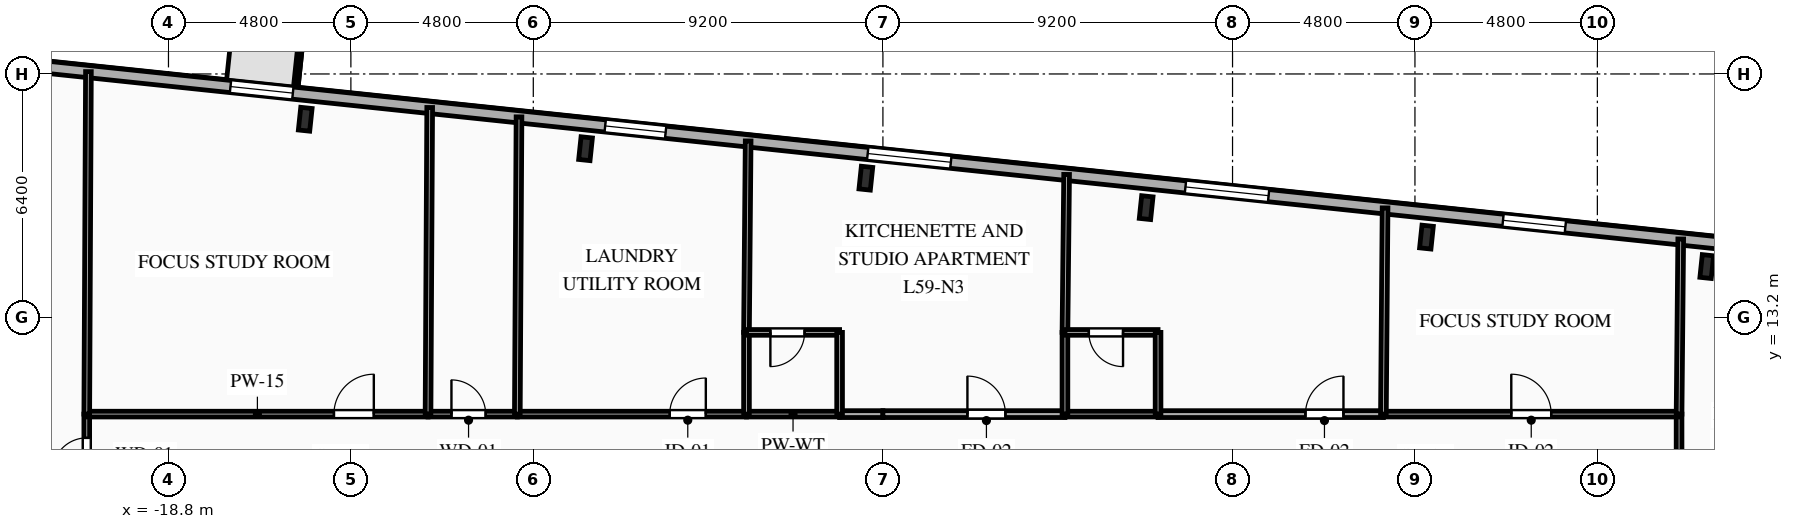
"""IFC4 building model, lengths in metres.
Left out: names, types, materials, properties, quantities, classifications, styles, units other than length and angle.
Written with IfcOpenShell. Run it as: python <this file> out.ifc"""

import sys

from ifc_helpers import new_model, si_unit, direction, frame, frame_2d, origin, origin_2d, place, context, subcontext, project, spatial, rectangle, i_section, extrude, element, fill, save


model = new_model("IFC4")
c1 = context("Model", 3, precision=1e-05, world=origin(), true_north=direction((0.0, 1.0)))
c2 = subcontext(c1, "Body", "Model", "MODEL_VIEW")
j1 = project(units=[si_unit("LENGTHUNIT", "METRE"), si_unit("PLANEANGLEUNIT", "RADIAN")], contexts=[c1])
p1 = place(None, origin())
s1 = spatial("IfcSite", under=j1, at=p1, CompositionType="ELEMENT")
p2 = place(p1, origin())
s2 = spatial("IfcBuilding", under=s1, at=p2, CompositionType="ELEMENT")
p3 = place(p2, frame((0.0, 0.0, 209.8)))
s3 = spatial("IfcBuildingStorey", under=s2, at=p3, CompositionType="ELEMENT", Elevation=209.8)
for number, where, z_axis, x_axis in (
    (1, (21.679, 14.532, 0.0), (0.0, 0.0, 1.0), (0.995, -0.105, 0.0)),
    (2, (14.303, 15.308, 0.0), (0.0, 0.0, 1.0), (0.995, -0.105, 0.0)),
    (3, (6.927, 16.083, 0.0), (0.0, 0.0, 1.0), (0.995, -0.105, 0.0)),
    (4, (-0.449, 16.858, 0.0), (0.0, 0.0, 1.0), (0.995, -0.105, 0.0)),
    (5, (-7.825, 17.634, 0.0), (0.0, 0.0, 1.0), (0.995, -0.105, 0.0)),
    (6, (-15.201, 18.409, 0.0), (0.0, 0.0, 1.0), (0.995, -0.105, 0.0)),
):
    element("IfcColumn", number, at=place(p3, frame(where, z_axis=z_axis, x_axis=x_axis)), inside=s3, PredefinedType="COLUMN", context=c2, shape_type="SweptSolid", body=[
        extrude(i_section(OverallWidth=0.3, OverallDepth=0.6, WebThickness=0.015, FlangeThickness=0.03, FilletRadius=0.027, at=origin_2d()), origin(), (0.0, 0.0, 1.0), 3.35),
    ])
p4 = place(p3, frame((-23.156, 19.898, 0.0), z_axis=(0.0, 0.0, 1.0), x_axis=(0.994522001802, -0.104527450613, 0.0)))
e7 = element("IfcWall", 7, at=p4, inside=s3, PredefinedType="SOLIDWALL", context=c2, shape_type="SweptSolid", body=[
    extrude(rectangle(XDim=45.8, YDim=0.32, at=frame_2d((22.9, 0.0))), origin(), (0.0, 0.0, 1.0), 3.04),
])
p5 = place(p4, frame((6.021, 0.0, 0.85)))
e8 = element("IfcOpeningElement", 8, at=p5, cuts=e7, PredefinedType="OPENING", context=c2, shape_type="SweptSolid", body=[
    extrude(rectangle(XDim=1.65, YDim=1.85, at=frame_2d((0.825, 0.925))), frame((0.0, 0.17, 0.0), z_axis=(0.0, -1.0, 0.0), x_axis=(1.0, 0.0, 0.0)), (0.0, 0.0, 1.0), 0.34),
])
p6 = place(p4, frame((15.935, 0.0, 0.85)))
e9 = element("IfcOpeningElement", 9, at=p6, cuts=e7, PredefinedType="OPENING", context=c2, shape_type="SweptSolid", body=[
    extrude(rectangle(XDim=1.6, YDim=1.85, at=frame_2d((0.8, 0.925))), frame((0.0, 0.17, 0.0), z_axis=(0.0, -1.0, 0.0), x_axis=(1.0, 0.0, 0.0)), (0.0, 0.0, 1.0), 0.34),
])
p7 = place(p4, frame((22.881, 0.0, 0.85)))
e10 = element("IfcOpeningElement", 10, at=p7, cuts=e7, PredefinedType="OPENING", context=c2, shape_type="SweptSolid", body=[
    extrude(rectangle(XDim=2.2, YDim=1.85, at=frame_2d((1.1, 0.925))), frame((0.0, 0.17, 0.0), z_axis=(0.0, -1.0, 0.0), x_axis=(1.0, 0.0, 0.0)), (0.0, 0.0, 1.0), 0.34),
])
p8 = place(p4, frame((31.288, 0.0, 0.85)))
e11 = element("IfcOpeningElement", 11, at=p8, cuts=e7, PredefinedType="OPENING", context=c2, shape_type="SweptSolid", body=[
    extrude(rectangle(XDim=2.2, YDim=1.85, at=frame_2d((1.1, 0.925))), frame((0.0, 0.17, 0.0), z_axis=(0.0, -1.0, 0.0), x_axis=(1.0, 0.0, 0.0)), (0.0, 0.0, 1.0), 0.34),
])
p9 = place(p4, frame((39.69, 0.0, 0.85)))
e12 = element("IfcOpeningElement", 12, at=p9, cuts=e7, PredefinedType="OPENING", context=c2, shape_type="SweptSolid", body=[
    extrude(rectangle(XDim=1.65, YDim=1.85, at=frame_2d((0.825, 0.925))), frame((0.0, 0.17, 0.0), z_axis=(0.0, -1.0, 0.0), x_axis=(1.0, 0.0, 0.0)), (0.0, 0.0, 1.0), 0.34),
])
p10 = place(p3, frame((-20.95, 8.5, 0.0), z_axis=(0.0, 0.0, 1.0), x_axis=(0.0, 1.0, 0.0)))
e13 = element("IfcWall", 13, at=p10, inside=s3, PredefinedType="PARTITIONING", context=c2, shape_type="SweptSolid", body=[
    extrude(rectangle(XDim=2.15, YDim=0.15, at=frame_2d((1.075, 0.0))), origin(), (0.0, 0.0, 1.0), 3.04),
])
p11 = place(p10, frame((0.625, 0.0, 0.0)))
e14 = element("IfcOpeningElement", 14, at=p11, cuts=e13, PredefinedType="OPENING", context=c2, shape_type="SweptSolid", body=[
    extrude(rectangle(XDim=0.9, YDim=2.1, at=frame_2d((0.45, 1.05))), frame((0.0, 0.085, 0.0), z_axis=(0.0, -1.0, 0.0), x_axis=(1.0, 0.0, 0.0)), (0.0, 0.0, 1.0), 0.17),
])
p12 = place(p3, frame((-20.95, 10.65, 0.0), z_axis=(0.0, 0.0, 1.0), x_axis=(1.0, 0.0, 0.0)))
e15 = element("IfcWall", 15, at=p12, inside=s3, PredefinedType="PARTITIONING", context=c2, shape_type="SweptSolid", body=[
    extrude(rectangle(XDim=8.98, YDim=0.15, at=frame_2d((4.49, 0.0))), origin(), (0.0, 0.0, 1.0), 3.04),
])
p13 = place(p12, frame((6.504, 0.0, 0.0)))
e16 = element("IfcOpeningElement", 16, at=p13, cuts=e15, PredefinedType="OPENING", context=c2, shape_type="SweptSolid", body=[
    extrude(rectangle(XDim=1.05, YDim=2.15, at=frame_2d((0.525, 1.075))), frame((0.0, 0.085, 0.0), z_axis=(0.0, -1.0, 0.0), x_axis=(1.0, 0.0, 0.0)), (0.0, 0.0, 1.0), 0.17),
])
p14 = place(p3, frame((-11.97, 10.65, 0.0), z_axis=(0.0, 0.0, 1.0), x_axis=(1.0, 0.0, 0.0)))
e17 = element("IfcWall", 17, at=p14, inside=s3, PredefinedType="PLUMBINGWALL", context=c2, shape_type="SweptSolid", body=[
    extrude(rectangle(XDim=2.35, YDim=0.15, at=frame_2d((1.175, 0.0))), origin(), (0.0, 0.0, 1.0), 3.04),
])
p15 = place(p14, frame((0.616, 0.0, 0.0)))
e18 = element("IfcOpeningElement", 18, at=p15, cuts=e17, PredefinedType="OPENING", context=c2, shape_type="SweptSolid", body=[
    extrude(rectangle(XDim=0.9, YDim=2.1, at=frame_2d((0.45, 1.05))), frame((0.0, 0.085, 0.0), z_axis=(0.0, -1.0, 0.0), x_axis=(1.0, 0.0, 0.0)), (0.0, 0.0, 1.0), 0.17),
])
p16 = place(p3, frame((-9.62, 10.65, 0.0), z_axis=(0.0, 0.0, 1.0), x_axis=(1.0, 0.0, 0.0)))
e19 = element("IfcWall", 19, at=p16, inside=s3, PredefinedType="PARTITIONING", context=c2, shape_type="SweptSolid", body=[
    extrude(rectangle(XDim=6.03, YDim=0.15, at=frame_2d((3.015, 0.0))), origin(), (0.0, 0.0, 1.0), 3.04),
])
p17 = place(p16, frame((4.01, 0.0, 0.0)))
e20 = element("IfcOpeningElement", 20, at=p17, cuts=e19, PredefinedType="OPENING", context=c2, shape_type="SweptSolid", body=[
    extrude(rectangle(XDim=0.95, YDim=2.1, at=frame_2d((0.475, 1.05))), frame((0.0, 0.085, 0.0), z_axis=(0.0, -1.0, 0.0), x_axis=(1.0, 0.0, 0.0)), (0.0, 0.0, 1.0), 0.17),
])
p18 = place(p3, frame((-1.14, 10.65, 0.0), z_axis=(0.0, 0.0, 1.0), x_axis=(1.0, 0.0, 0.0)))
e21 = element("IfcWall", 21, at=p18, inside=s3, PredefinedType="PARTITIONING", context=c2, shape_type="SweptSolid", body=[
    extrude(rectangle(XDim=1.14, YDim=0.18, at=frame_2d((0.57, 0.0))), origin(), (0.0, 0.0, 1.0), 3.04),
])
p19 = place(p3, frame((-3.59, 10.65, 0.0), z_axis=(0.0, 0.0, 1.0), x_axis=(1.0, 0.0, 0.0)))
e22 = element("IfcWall", 22, at=p19, inside=s3, PredefinedType="PLUMBINGWALL", context=c2, shape_type="SweptSolid", body=[
    extrude(rectangle(XDim=2.45, YDim=0.15, at=frame_2d((1.225, 0.0))), origin(), (0.0, 0.0, 1.0), 3.04),
])
p20 = place(p3, frame((20.95, 10.65, 0.0), z_axis=(0.0, 0.0, 1.0), x_axis=(0.0, -1.0, 0.0)))
e23 = element("IfcWall", 23, at=p20, inside=s3, PredefinedType="PARTITIONING", context=c2, shape_type="SweptSolid", body=[
    extrude(rectangle(XDim=2.15, YDim=0.15, at=frame_2d((1.075, 0.0))), origin(), (0.0, 0.0, 1.0), 3.04),
])
p21 = place(p3, frame((0.0, 10.65, 0.0), z_axis=(0.0, 0.0, 1.0), x_axis=(1.0, 0.0, 0.0)))
e24 = element("IfcWall", 24, at=p21, inside=s3, PredefinedType="PARTITIONING", context=c2, shape_type="SweptSolid", body=[
    extrude(rectangle(XDim=4.79, YDim=0.18, at=frame_2d((2.395, 0.0))), origin(), (0.0, 0.0, 1.0), 3.04),
])
p22 = place(p21, frame((2.224, 0.0, 0.0)))
e25 = element("IfcOpeningElement", 25, at=p22, cuts=e24, PredefinedType="OPENING", context=c2, shape_type="SweptSolid", body=[
    extrude(rectangle(XDim=1.0, YDim=2.15, at=frame_2d((0.5, 1.075))), frame((0.0, 0.1, 0.0), z_axis=(0.0, -1.0, 0.0), x_axis=(1.0, 0.0, 0.0)), (0.0, 0.0, 1.0), 0.2),
])
p23 = place(p3, frame((7.24, 10.65, 0.0), z_axis=(0.0, 0.0, 1.0), x_axis=(1.0, 0.0, 0.0)))
e26 = element("IfcWall", 26, at=p23, inside=s3, PredefinedType="PARTITIONING", context=c2, shape_type="SweptSolid", body=[
    extrude(rectangle(XDim=5.93, YDim=0.18, at=frame_2d((2.965, 0.0))), origin(), (0.0, 0.0, 1.0), 3.04),
])
p24 = place(p23, frame((3.879, 0.0, 0.0)))
e27 = element("IfcOpeningElement", 27, at=p24, cuts=e26, PredefinedType="OPENING", context=c2, shape_type="SweptSolid", body=[
    extrude(rectangle(XDim=1.0, YDim=2.15, at=frame_2d((0.5, 1.075))), frame((0.0, 0.1, 0.0), z_axis=(0.0, -1.0, 0.0), x_axis=(1.0, 0.0, 0.0)), (0.0, 0.0, 1.0), 0.2),
])
p25 = place(p3, frame((4.79, 10.65, 0.0), z_axis=(0.0, 0.0, 1.0), x_axis=(1.0, 0.0, 0.0)))
e28 = element("IfcWall", 28, at=p25, inside=s3, PredefinedType="PLUMBINGWALL", context=c2, shape_type="SweptSolid", body=[
    extrude(rectangle(XDim=2.45, YDim=0.15, at=frame_2d((1.225, 0.0))), origin(), (0.0, 0.0, 1.0), 3.04),
])
p26 = place(p3, frame((13.17, 10.65, 0.0), z_axis=(0.0, 0.0, 1.0), x_axis=(1.0, 0.0, 0.0)))
e29 = element("IfcWall", 29, at=p26, inside=s3, PredefinedType="PARTITIONING", context=c2, shape_type="SweptSolid", body=[
    extrude(rectangle(XDim=7.78, YDim=0.15, at=frame_2d((3.89, 0.0))), origin(), (0.0, 0.0, 1.0), 3.04),
])
p27 = place(p26, frame((3.365, 0.0, 0.0)))
e30 = element("IfcOpeningElement", 30, at=p27, cuts=e29, PredefinedType="OPENING", context=c2, shape_type="SweptSolid", body=[
    extrude(rectangle(XDim=1.05, YDim=2.15, at=frame_2d((0.525, 1.075))), frame((0.0, 0.085, 0.0), z_axis=(0.0, -1.0, 0.0), x_axis=(1.0, 0.0, 0.0)), (0.0, 0.0, 1.0), 0.17),
])
p28 = place(p3, frame((-20.906, 19.662, 0.0), z_axis=(0.0, 0.0, 1.0), x_axis=(-0.004876272857, -0.999988110911, 0.0)))
e31 = element("IfcWall", 31, at=p28, inside=s3, PredefinedType="PARTITIONING", context=c2, shape_type="SweptSolid", body=[
    extrude(rectangle(XDim=9.012, YDim=0.15, at=frame_2d((4.506, 0.0))), origin(), (0.0, 0.0, 1.0), 2.665),
])
p29 = place(p3, frame((20.95, 10.65, 0.0), z_axis=(0.0, 0.0, 1.0), x_axis=(0.009535990233, 0.999954531411, 0.0)))
e32 = element("IfcWall", 32, at=p29, inside=s3, PredefinedType="PARTITIONING", context=c2, shape_type="SweptSolid", body=[
    extrude(rectangle(XDim=4.608, YDim=0.15, at=frame_2d((2.304, 0.0))), origin(), (0.0, 0.0, 1.0), 2.665),
])
p30 = place(p3, frame((-11.926, 18.718, 0.0), z_axis=(0.0, 0.0, 1.0), x_axis=(-0.005446707114, -0.999985166581, 0.0)))
e33 = element("IfcWall", 33, at=p30, inside=s3, PredefinedType="PLUMBINGWALL", context=c2, shape_type="SweptSolid", body=[
    extrude(rectangle(XDim=8.068, YDim=0.15, at=frame_2d((4.034, 0.0))), origin(), (0.0, 0.0, 1.0), 3.04),
])
p31 = place(p3, frame((-9.576, 18.471, 0.0), z_axis=(0.0, 0.0, 1.0), x_axis=(-0.005618590299, -0.999984215597, 0.0)))
e34 = element("IfcWall", 34, at=p31, inside=s3, PredefinedType="PLUMBINGWALL", context=c2, shape_type="SweptSolid", body=[
    extrude(rectangle(XDim=7.822, YDim=0.15, at=frame_2d((3.911, 0.0))), origin(), (0.0, 0.0, 1.0), 3.04),
])
p32 = place(p3, frame((-3.546, 17.837, 0.0), z_axis=(0.0, 0.0, 1.0), x_axis=(-0.008723556964, -0.999961949053, 0.0)))
e35 = element("IfcWall", 35, at=p32, inside=s3, PredefinedType="PARTITIONING", context=c2, shape_type="SweptSolid", body=[
    extrude(rectangle(XDim=5.038, YDim=0.15, at=frame_2d((2.519, 0.0))), origin(), (0.0, 0.0, 1.0), 3.04),
])
p33 = place(p3, frame((-3.59, 12.8, 0.0), z_axis=(0.0, 0.0, 1.0), x_axis=(0.0, -1.0, 0.0)))
e36 = element("IfcWall", 36, at=p33, inside=s3, PredefinedType="PLUMBINGWALL", context=c2, shape_type="SweptSolid", body=[
    extrude(rectangle(XDim=2.15, YDim=0.15, at=frame_2d((1.075, 0.0))), origin(), (0.0, 0.0, 1.0), 3.04),
])
p34 = place(p3, frame((-1.14, 12.8, 0.0), z_axis=(0.0, 0.0, 1.0), x_axis=(-1.0, 0.0, 0.0)))
e37 = element("IfcWall", 37, at=p34, inside=s3, PredefinedType="PLUMBINGWALL", context=c2, shape_type="SweptSolid", body=[
    extrude(rectangle(XDim=2.45, YDim=0.15, at=frame_2d((1.225, 0.0))), origin(), (0.0, 0.0, 1.0), 3.04),
])
p35 = place(p34, frame((0.921, 0.0, 0.0)))
e38 = element("IfcOpeningElement", 38, at=p35, cuts=e37, PredefinedType="OPENING", context=c2, shape_type="SweptSolid", body=[
    extrude(rectangle(XDim=0.9, YDim=2.1, at=frame_2d((0.45, 1.05))), frame((0.0, 0.085, 0.0), z_axis=(0.0, -1.0, 0.0), x_axis=(1.0, 0.0, 0.0)), (0.0, 0.0, 1.0), 0.17),
])
p36 = place(p3, frame((-1.14, 10.65, 0.0), z_axis=(0.0, 0.0, 1.0), x_axis=(0.0, 1.0, 0.0)))
e39 = element("IfcWall", 39, at=p36, inside=s3, PredefinedType="PLUMBINGWALL", context=c2, shape_type="SweptSolid", body=[
    extrude(rectangle(XDim=2.15, YDim=0.15, at=frame_2d((1.075, 0.0))), origin(), (0.0, 0.0, 1.0), 3.04),
])
p37 = place(p3, frame((4.834, 16.957, 0.0), z_axis=(0.0, 0.0, 1.0), x_axis=(-0.010572096358, -0.999944113828, 0.0)))
e40 = element("IfcWall", 40, at=p37, inside=s3, PredefinedType="PARTITIONING", context=c2, shape_type="SweptSolid", body=[
    extrude(rectangle(XDim=4.157, YDim=0.15, at=frame_2d((2.078, 0.0))), origin(), (0.0, 0.0, 1.0), 3.04),
])
p38 = place(p3, frame((4.79, 12.8, 0.0), z_axis=(0.0, 0.0, 1.0), x_axis=(0.0, -1.0, 0.0)))
e41 = element("IfcWall", 41, at=p38, inside=s3, PredefinedType="PLUMBINGWALL", context=c2, shape_type="SweptSolid", body=[
    extrude(rectangle(XDim=2.15, YDim=0.15, at=frame_2d((1.075, 0.0))), origin(), (0.0, 0.0, 1.0), 3.04),
])
p39 = place(p3, frame((7.24, 12.8, 0.0), z_axis=(0.0, 0.0, 1.0), x_axis=(-1.0, 0.0, 0.0)))
e42 = element("IfcWall", 42, at=p39, inside=s3, PredefinedType="PLUMBINGWALL", context=c2, shape_type="SweptSolid", body=[
    extrude(rectangle(XDim=2.45, YDim=0.15, at=frame_2d((1.225, 0.0))), origin(), (0.0, 0.0, 1.0), 3.04),
])
p40 = place(p39, frame((0.921, 0.0, 0.0)))
e43 = element("IfcOpeningElement", 43, at=p40, cuts=e42, PredefinedType="OPENING", context=c2, shape_type="SweptSolid", body=[
    extrude(rectangle(XDim=0.9, YDim=2.1, at=frame_2d((0.45, 1.05))), frame((0.0, 0.085, 0.0), z_axis=(0.0, -1.0, 0.0), x_axis=(1.0, 0.0, 0.0)), (0.0, 0.0, 1.0), 0.17),
])
p41 = place(p3, frame((7.24, 10.65, 0.0), z_axis=(0.0, 0.0, 1.0), x_axis=(0.0, 1.0, 0.0)))
e44 = element("IfcWall", 44, at=p41, inside=s3, PredefinedType="PLUMBINGWALL", context=c2, shape_type="SweptSolid", body=[
    extrude(rectangle(XDim=2.15, YDim=0.15, at=frame_2d((1.075, 0.0))), origin(), (0.0, 0.0, 1.0), 3.04),
])
p42 = place(p3, frame((13.214, 16.076, 0.0), z_axis=(0.0, 0.0, 1.0), x_axis=(-0.008099086408, -0.999967201862, 0.0)))
e45 = element("IfcWall", 45, at=p42, inside=s3, PredefinedType="PARTITIONING", context=c2, shape_type="SweptSolid", body=[
    extrude(rectangle(XDim=5.426, YDim=0.15, at=frame_2d((2.713, 0.0))), origin(), (0.0, 0.0, 1.0), 3.04),
])
p43 = place(p5, origin())
e46 = element("IfcWindow", 46, at=p43, inside=s3, PartitioningType="SINGLE_PANEL", PredefinedType="WINDOW", context=c2, shape_type="SweptSolid", body=[
    extrude(rectangle(XDim=1.65, YDim=1.85, at=frame_2d((0.825, 0.925))), frame((0.0, 0.03, 0.0), z_axis=(0.0, -1.0, 0.0), x_axis=(1.0, 0.0, 0.0)), (0.0, 0.0, 1.0), 0.06),
])
fill(e8, e46)
p44 = place(p6, origin())
e47 = element("IfcWindow", 47, at=p44, inside=s3, PartitioningType="SINGLE_PANEL", PredefinedType="WINDOW", context=c2, shape_type="SweptSolid", body=[
    extrude(rectangle(XDim=1.6, YDim=1.85, at=frame_2d((0.8, 0.925))), frame((0.0, 0.03, 0.0), z_axis=(0.0, -1.0, 0.0), x_axis=(1.0, 0.0, 0.0)), (0.0, 0.0, 1.0), 0.06),
])
fill(e9, e47)
p45 = place(p7, origin())
e48 = element("IfcWindow", 48, at=p45, inside=s3, PartitioningType="SINGLE_PANEL", PredefinedType="WINDOW", context=c2, shape_type="SweptSolid", body=[
    extrude(rectangle(XDim=2.2, YDim=1.85, at=frame_2d((1.1, 0.925))), frame((0.0, 0.03, 0.0), z_axis=(0.0, -1.0, 0.0), x_axis=(1.0, 0.0, 0.0)), (0.0, 0.0, 1.0), 0.06),
])
fill(e10, e48)
p46 = place(p8, origin())
e49 = element("IfcWindow", 49, at=p46, inside=s3, PartitioningType="SINGLE_PANEL", PredefinedType="WINDOW", context=c2, shape_type="SweptSolid", body=[
    extrude(rectangle(XDim=2.2, YDim=1.85, at=frame_2d((1.1, 0.925))), frame((0.0, 0.03, 0.0), z_axis=(0.0, -1.0, 0.0), x_axis=(1.0, 0.0, 0.0)), (0.0, 0.0, 1.0), 0.06),
])
fill(e11, e49)
p47 = place(p9, origin())
e50 = element("IfcWindow", 50, at=p47, inside=s3, PartitioningType="SINGLE_PANEL", PredefinedType="WINDOW", context=c2, shape_type="SweptSolid", body=[
    extrude(rectangle(XDim=1.65, YDim=1.85, at=frame_2d((0.825, 0.925))), frame((0.0, 0.03, 0.0), z_axis=(0.0, -1.0, 0.0), x_axis=(1.0, 0.0, 0.0)), (0.0, 0.0, 1.0), 0.06),
])
fill(e12, e50)
p48 = place(p11, origin())
e51 = element("IfcDoor", 51, at=p48, inside=s3, OperationType="SINGLE_SWING_LEFT", PredefinedType="DOOR", context=c2, shape_type="SweptSolid", body=[
    extrude(rectangle(XDim=0.9, YDim=2.1, at=frame_2d((0.45, 1.05))), frame((0.0, 0.025, 0.0), z_axis=(0.0, -1.0, 0.0), x_axis=(1.0, 0.0, 0.0)), (0.0, 0.0, 1.0), 0.05),
])
fill(e14, e51)
p49 = place(p13, origin())
e52 = element("IfcDoor", 52, at=p49, inside=s3, OperationType="SINGLE_SWING_RIGHT", PredefinedType="DOOR", context=c2, shape_type="SweptSolid", body=[
    extrude(rectangle(XDim=1.05, YDim=2.15, at=frame_2d((0.525, 1.075))), frame((0.0, 0.025, 0.0), z_axis=(0.0, -1.0, 0.0), x_axis=(1.0, 0.0, 0.0)), (0.0, 0.0, 1.0), 0.05),
])
fill(e16, e52)
p50 = place(p15, origin())
e53 = element("IfcDoor", 53, at=p50, inside=s3, OperationType="SINGLE_SWING_LEFT", PredefinedType="DOOR", context=c2, shape_type="SweptSolid", body=[
    extrude(rectangle(XDim=0.9, YDim=2.1, at=frame_2d((0.45, 1.05))), frame((0.0, 0.025, 0.0), z_axis=(0.0, -1.0, 0.0), x_axis=(1.0, 0.0, 0.0)), (0.0, 0.0, 1.0), 0.05),
])
fill(e18, e53)
p51 = place(p17, origin())
e54 = element("IfcDoor", 54, at=p51, inside=s3, OperationType="SINGLE_SWING_RIGHT", PredefinedType="DOOR", context=c2, shape_type="SweptSolid", body=[
    extrude(rectangle(XDim=0.95, YDim=2.1, at=frame_2d((0.475, 1.05))), frame((0.0, 0.025, 0.0), z_axis=(0.0, -1.0, 0.0), x_axis=(1.0, 0.0, 0.0)), (0.0, 0.0, 1.0), 0.05),
])
fill(e20, e54)
p52 = place(p22, origin())
e55 = element("IfcDoor", 55, at=p52, inside=s3, OperationType="SINGLE_SWING_LEFT", PredefinedType="DOOR", context=c2, shape_type="SweptSolid", body=[
    extrude(rectangle(XDim=1.0, YDim=2.15, at=frame_2d((0.5, 1.075))), frame((0.0, 0.025, 0.0), z_axis=(0.0, -1.0, 0.0), x_axis=(1.0, 0.0, 0.0)), (0.0, 0.0, 1.0), 0.05),
])
fill(e25, e55)
p53 = place(p24, origin())
e56 = element("IfcDoor", 56, at=p53, inside=s3, OperationType="SINGLE_SWING_RIGHT", PredefinedType="DOOR", context=c2, shape_type="SweptSolid", body=[
    extrude(rectangle(XDim=1.0, YDim=2.15, at=frame_2d((0.5, 1.075))), frame((0.0, 0.025, 0.0), z_axis=(0.0, -1.0, 0.0), x_axis=(1.0, 0.0, 0.0)), (0.0, 0.0, 1.0), 0.05),
])
fill(e27, e56)
p54 = place(p27, origin())
e57 = element("IfcDoor", 57, at=p54, inside=s3, OperationType="SINGLE_SWING_LEFT", PredefinedType="DOOR", context=c2, shape_type="SweptSolid", body=[
    extrude(rectangle(XDim=1.05, YDim=2.15, at=frame_2d((0.525, 1.075))), frame((0.0, 0.025, 0.0), z_axis=(0.0, -1.0, 0.0), x_axis=(1.0, 0.0, 0.0)), (0.0, 0.0, 1.0), 0.05),
])
fill(e30, e57)
p55 = place(p35, origin())
e58 = element("IfcDoor", 58, at=p55, inside=s3, OperationType="SINGLE_SWING_RIGHT", PredefinedType="DOOR", context=c2, shape_type="SweptSolid", body=[
    extrude(rectangle(XDim=0.9, YDim=2.1, at=frame_2d((0.45, 1.05))), frame((0.0, 0.025, 0.0), z_axis=(0.0, -1.0, 0.0), x_axis=(1.0, 0.0, 0.0)), (0.0, 0.0, 1.0), 0.05),
])
fill(e38, e58)
p56 = place(p40, origin())
e59 = element("IfcDoor", 59, at=p56, inside=s3, OperationType="SINGLE_SWING_LEFT", PredefinedType="DOOR", context=c2, shape_type="SweptSolid", body=[
    extrude(rectangle(XDim=0.9, YDim=2.1, at=frame_2d((0.45, 1.05))), frame((0.0, 0.025, 0.0), z_axis=(0.0, -1.0, 0.0), x_axis=(1.0, 0.0, 0.0)), (0.0, 0.0, 1.0), 0.05),
])
fill(e43, e59)
save(model, sys.argv[1])
